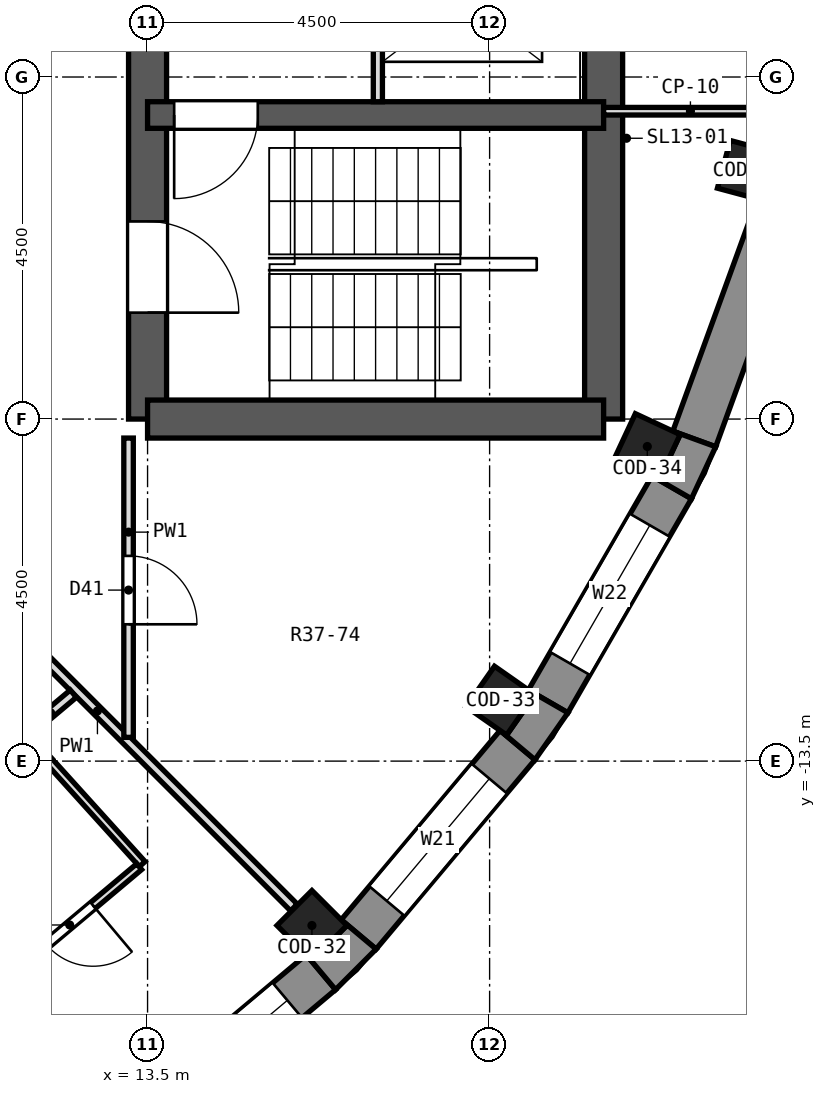
"""IFC4 building model, lengths in metres.
Left out: names, types, materials, properties, quantities, classifications, styles, units other than length and angle.
Written with IfcOpenShell. Run it as: python <this file> out.ifc"""

import sys

from ifc_helpers import new_model, si_unit, direction, frame, frame_2d, origin, origin_2d, place, context, subcontext, project, spatial, polyline, rectangle, outline, extrude, element, fill, save


model = new_model("IFC4")
c1 = context("Model", 3, precision=1e-05, world=origin(), true_north=direction((0.0, 1.0)))
c2 = subcontext(c1, "Body", "Model", "MODEL_VIEW")
j1 = project(units=[si_unit("LENGTHUNIT", "METRE"), si_unit("PLANEANGLEUNIT", "RADIAN")], contexts=[c1])
p1 = place(None, origin())
s1 = spatial("IfcSite", under=j1, at=p1, CompositionType="ELEMENT")
p2 = place(p1, origin())
s2 = spatial("IfcBuilding", under=s1, at=p2, CompositionType="ELEMENT")
p3 = place(p2, frame((0.0, 0.0, 269.3)))
s3 = spatial("IfcBuildingStorey", under=s2, at=p3, CompositionType="ELEMENT", Elevation=269.3)
for number, where, z_axis, x_axis in (
    (1, (15.662, -15.662, 0.0), (0.0, 0.0, 1.0), (0.707, -0.707, 0.0)),
    (2, (18.144, -12.705, 0.0), (0.0, 0.0, 1.0), (0.819, -0.574, 0.0)),
    (3, (20.075, -9.361, 0.0), (0.0, 0.0, 1.0), (0.906, -0.423, 0.0)),
    (4, (21.395, -5.733, 0.0), (0.0, 0.0, 1.0), (0.966, -0.259, 0.0)),
):
    element("IfcColumn", number, at=place(p3, frame(where, z_axis=z_axis, x_axis=x_axis)), inside=s3, PredefinedType="COLUMN", context=c2, shape_type="SweptSolid", body=[
        extrude(rectangle(XDim=0.65, YDim=0.65, at=origin_2d()), origin(), (0.0, 0.0, 1.0), 3.3),
    ])
p4 = place(p3, frame((13.5, -9.0, 0.0), z_axis=(0.0, 0.0, 1.0), x_axis=(0.0, 1.0, 0.0)))
e5 = element("IfcWall", 5, at=p4, inside=s3, PredefinedType="SHEAR", context=c2, shape_type="SweptSolid", body=[
    extrude(rectangle(XDim=18.0, YDim=0.5, at=frame_2d((9.0, 0.0))), origin(), (0.0, 0.0, 1.0), 3.3),
])
p5 = place(p4, frame((15.4, 0.0, 0.0)))
e6 = element("IfcOpeningElement", 6, at=p5, cuts=e5, PredefinedType="OPENING", context=c2, shape_type="SweptSolid", body=[
    extrude(rectangle(XDim=1.2, YDim=2.1, at=frame_2d((0.6, 1.05))), frame((0.0, 0.262, 0.0), z_axis=(0.0, -1.0, 0.0), x_axis=(1.0, 0.0, 0.0)), (0.0, 0.0, 1.0), 0.524),
])
p6 = place(p4, frame((1.4, 0.0, 0.0)))
e7 = element("IfcOpeningElement", 7, at=p6, cuts=e5, PredefinedType="OPENING", context=c2, shape_type="SweptSolid", body=[
    extrude(rectangle(XDim=1.2, YDim=2.1, at=frame_2d((0.6, 1.05))), frame((0.0, 0.262, 0.0), z_axis=(0.0, -1.0, 0.0), x_axis=(1.0, 0.0, 0.0)), (0.0, 0.0, 1.0), 0.524),
])
p7 = place(p4, frame((7.5, 0.0, 0.0)))
e8 = element("IfcOpeningElement", 8, at=p7, cuts=e5, PredefinedType="OPENING", context=c2, shape_type="SweptSolid", body=[
    extrude(rectangle(XDim=3.0, YDim=2.4, at=frame_2d((1.5, 1.2))), frame((0.0, 0.262, 0.0), z_axis=(0.0, -1.0, 0.0), x_axis=(1.0, 0.0, 0.0)), (0.0, 0.0, 1.0), 0.524),
])
p8 = place(p3, frame((19.5, -9.0, 0.0), z_axis=(0.0, 0.0, 1.0), x_axis=(0.0, 1.0, 0.0)))
e9 = element("IfcWall", 9, at=p8, inside=s3, PredefinedType="SHEAR", context=c2, shape_type="SweptSolid", body=[
    extrude(rectangle(XDim=18.0, YDim=0.5, at=frame_2d((9.0, 0.0))), origin(), (0.0, 0.0, 1.0), 3.3),
])
p9 = place(p8, frame((9.45, 0.0, 0.0)))
e10 = element("IfcOpeningElement", 10, at=p9, cuts=e9, PredefinedType="OPENING", context=c2, shape_type="SweptSolid", body=[
    extrude(rectangle(XDim=0.9, YDim=2.1, at=frame_2d((0.45, 1.05))), frame((0.0, 0.262, 0.0), z_axis=(0.0, -1.0, 0.0), x_axis=(1.0, 0.0, 0.0)), (0.0, 0.0, 1.0), 0.524),
])
p10 = place(p8, frame((7.65, 0.0, 0.0)))
e11 = element("IfcOpeningElement", 11, at=p10, cuts=e9, PredefinedType="OPENING", context=c2, shape_type="SweptSolid", body=[
    extrude(rectangle(XDim=0.9, YDim=2.1, at=frame_2d((0.45, 1.05))), frame((0.0, 0.262, 0.0), z_axis=(0.0, -1.0, 0.0), x_axis=(1.0, 0.0, 0.0)), (0.0, 0.0, 1.0), 0.524),
])
p11 = place(p3, frame((13.5, -9.0, 0.0), z_axis=(0.0, 0.0, 1.0), x_axis=(1.0, 0.0, 0.0)))
e12 = element("IfcWall", 12, at=p11, inside=s3, PredefinedType="SHEAR", context=c2, shape_type="SweptSolid", body=[
    extrude(rectangle(XDim=6.0, YDim=0.5, at=frame_2d((3.0, 0.0))), origin(), (0.0, 0.0, 1.0), 3.3),
])
p12 = place(p3, frame((13.5, -5.0, 0.0), z_axis=(0.0, 0.0, 1.0), x_axis=(1.0, 0.0, 0.0)))
e13 = element("IfcWall", 13, at=p12, inside=s3, PredefinedType="SHEAR", context=c2, shape_type="SweptSolid", body=[
    extrude(rectangle(XDim=6.0, YDim=0.35, at=frame_2d((3.0, 0.0))), origin(), (0.0, 0.0, 1.0), 3.3),
])
p13 = place(p12, frame((0.35, 0.0, 0.0)))
e14 = element("IfcOpeningElement", 14, at=p13, cuts=e13, PredefinedType="OPENING", context=c2, shape_type="SweptSolid", body=[
    extrude(rectangle(XDim=1.1, YDim=2.1, at=frame_2d((0.55, 1.05))), frame((0.0, 0.187, 0.0), z_axis=(0.0, -1.0, 0.0), x_axis=(1.0, 0.0, 0.0)), (0.0, 0.0, 1.0), 0.374),
])
p14 = place(p3, frame((13.29, -18.367, 0.0), z_axis=(0.0, 0.0, 1.0), x_axis=(0.766056773982, 0.64277291405, 0.0)))
e15 = element("IfcWall", 15, at=p14, inside=s3, PredefinedType="SOLIDWALL", context=c2, shape_type="SweptSolid", body=[
    extrude(rectangle(XDim=3.252, YDim=0.6, at=frame_2d((1.626, 0.0))), origin(), (0.0, 0.0, 1.0), 2.9),
])
p15 = place(p14, frame((0.576, 0.0, 0.9)))
e16 = element("IfcOpeningElement", 16, at=p15, cuts=e15, PredefinedType="OPENING", context=c2, shape_type="SweptSolid", body=[
    extrude(rectangle(XDim=2.1, YDim=1.8, at=frame_2d((1.05, 0.9))), frame((0.0, 0.312, 0.0), z_axis=(0.0, -1.0, 0.0), x_axis=(1.0, 0.0, 0.0)), (0.0, 0.0, 1.0), 0.624),
])
p16 = place(p3, frame((16.277, -15.781, 0.0), z_axis=(0.0, 0.0, 1.0), x_axis=(0.64277291405, 0.766056773982, 0.0)))
e17 = element("IfcWall", 17, at=p16, inside=s3, PredefinedType="SOLIDWALL", context=c2, shape_type="SweptSolid", body=[
    extrude(rectangle(XDim=3.252, YDim=0.6, at=frame_2d((1.626, 0.0))), origin(), (0.0, 0.0, 1.0), 2.9),
])
p17 = place(p16, frame((0.576, 0.0, 0.9)))
e18 = element("IfcOpeningElement", 18, at=p17, cuts=e17, PredefinedType="OPENING", context=c2, shape_type="SweptSolid", body=[
    extrude(rectangle(XDim=2.1, YDim=1.8, at=frame_2d((1.05, 0.9))), frame((0.0, 0.312, 0.0), z_axis=(0.0, -1.0, 0.0), x_axis=(1.0, 0.0, 0.0)), (0.0, 0.0, 1.0), 0.624),
])
p18 = place(p3, frame((18.77, -12.714, 0.0), z_axis=(0.0, 0.0, 1.0), x_axis=(0.500014901547, 0.866016800201, 0.0)))
e19 = element("IfcWall", 19, at=p18, inside=s3, PredefinedType="SOLIDWALL", context=c2, shape_type="SweptSolid", body=[
    extrude(rectangle(XDim=3.252, YDim=0.6, at=frame_2d((1.626, 0.0))), origin(), (0.0, 0.0, 1.0), 2.9),
])
p19 = place(p18, frame((0.576, 0.0, 0.9)))
e20 = element("IfcOpeningElement", 20, at=p19, cuts=e19, PredefinedType="OPENING", context=c2, shape_type="SweptSolid", body=[
    extrude(rectangle(XDim=2.1, YDim=1.8, at=frame_2d((1.05, 0.9))), frame((0.0, 0.312, 0.0), z_axis=(0.0, -1.0, 0.0), x_axis=(1.0, 0.0, 0.0)), (0.0, 0.0, 1.0), 0.624),
])
p20 = place(p3, frame((20.693, -9.262, 0.0), z_axis=(0.0, 0.0, 1.0), x_axis=(0.342056509473, 0.939679383794, 0.0)))
e21 = element("IfcWall", 21, at=p20, inside=s3, PredefinedType="SOLIDWALL", context=c2, shape_type="SweptSolid", body=[
    extrude(rectangle(XDim=3.252, YDim=0.6, at=frame_2d((1.626, 0.0))), origin(), (0.0, 0.0, 1.0), 2.9),
])
p21 = place(p3, origin())
e22 = element("IfcWall", 22, at=p21, inside=s3, PredefinedType="SOLIDWALL", context=c2, shape_type="SweptSolid", body=[
    extrude(outline(polyline([(16.507, -15.973), (16.047, -15.588), (16.122, -15.662), (15.662, -16.122), (15.588, -16.047), (15.973, -16.507), (16.507, -15.973)])), origin(), (0.0, 0.0, 1.0), 2.9),
])
p22 = place(p3, origin())
e23 = element("IfcWall", 23, at=p22, inside=s3, PredefinedType="SOLIDWALL", context=c2, shape_type="SweptSolid", body=[
    extrude(outline(polyline([(19.03, -12.864), (18.51, -12.564), (18.597, -12.625), (18.224, -13.157), (18.137, -13.097), (18.597, -13.482), (19.03, -12.864)])), origin(), (0.0, 0.0, 1.0), 2.9),
])
p23 = place(p3, origin())
e24 = element("IfcWall", 24, at=p23, inside=s3, PredefinedType="SOLIDWALL", context=c2, shape_type="SweptSolid", body=[
    extrude(outline(polyline([(20.656, -10.048), (20.975, -9.364), (20.411, -9.159), (20.507, -9.204), (20.232, -9.793), (20.136, -9.748), (20.656, -10.048)])), origin(), (0.0, 0.0, 1.0), 2.9),
])
p24 = place(p3, frame((11.887, -13.148, 0.0), z_axis=(0.0, 0.0, 1.0), x_axis=(0.67055763685, -0.741857436211, 0.0)))
e25 = element("IfcWall", 25, at=p24, inside=s3, PredefinedType="PARTITIONING", context=c2, shape_type="SweptSolid", body=[
    extrude(rectangle(XDim=2.301, YDim=0.1, at=frame_2d((1.15, 0.0))), origin(), (0.0, 0.0, 1.0), 2.9),
])
p25 = place(p3, frame((10.256, -10.256, 0.0), z_axis=(0.0, 0.0, 1.0), x_axis=(0.707106781187, -0.707106781187, 0.0)))
e26 = element("IfcWall", 26, at=p25, inside=s3, PredefinedType="PARTITIONING", context=c2, shape_type="SweptSolid", body=[
    extrude(rectangle(XDim=7.311, YDim=0.125, at=frame_2d((3.655, 0.0))), origin(), (0.0, 0.0, 1.0), 2.9),
])
p26 = place(p25, frame((1.188, 0.0, 0.0)))
e27 = element("IfcOpeningElement", 27, at=p26, cuts=e26, PredefinedType="OPENING", context=c2, shape_type="SweptSolid", body=[
    extrude(rectangle(XDim=0.9, YDim=2.1, at=frame_2d((0.45, 1.05))), frame((0.0, 0.074, 0.0), z_axis=(0.0, -1.0, 0.0), x_axis=(1.0, 0.0, 0.0)), (0.0, 0.0, 1.0), 0.149),
])
p27 = place(p3, frame((11.561, -16.424, 0.0), z_axis=(0.0, 0.0, 1.0), x_axis=(0.765894211942, 0.642966605753, 0.0)))
e28 = element("IfcWall", 28, at=p27, inside=s3, PredefinedType="PARTITIONING", context=c2, shape_type="SweptSolid", body=[
    extrude(rectangle(XDim=2.387, YDim=0.1, at=frame_2d((1.194, 0.0))), origin(), (0.0, 0.0, 1.0), 2.9),
])
p28 = place(p27, frame((0.794, 0.0, 0.0)))
e29 = element("IfcOpeningElement", 29, at=p28, cuts=e28, PredefinedType="OPENING", context=c2, shape_type="SweptSolid", body=[
    extrude(rectangle(XDim=0.8, YDim=2.1, at=frame_2d((0.4, 1.05))), frame((0.0, 0.062, 0.0), z_axis=(0.0, -1.0, 0.0), x_axis=(1.0, 0.0, 0.0)), (0.0, 0.0, 1.0), 0.124),
])
p29 = place(p3, frame((11.926, -13.115, 0.0), z_axis=(0.0, 0.0, 1.0), x_axis=(0.765365590348, 0.643595768407, 0.0)))
e30 = element("IfcWall", 30, at=p29, inside=s3, PredefinedType="PARTITIONING", context=c2, shape_type="SweptSolid", body=[
    extrude(rectangle(XDim=0.78, YDim=0.125, at=frame_2d((0.39, 0.0))), origin(), (0.0, 0.0, 1.0), 2.9),
])
p30 = place(p3, frame((13.25, -13.188, 0.0), z_axis=(0.0, 0.0, 1.0), x_axis=(0.0, 1.0, 0.0)))
e31 = element("IfcWall", 31, at=p30, inside=s3, PredefinedType="PARTITIONING", context=c2, shape_type="SweptSolid", body=[
    extrude(rectangle(XDim=3.938, YDim=0.125, at=frame_2d((1.969, 0.0))), origin(), (0.0, 0.0, 1.0), 2.9),
])
p31 = place(p30, frame((1.488, 0.0, 0.0)))
e32 = element("IfcOpeningElement", 32, at=p31, cuts=e31, PredefinedType="OPENING", context=c2, shape_type="SweptSolid", body=[
    extrude(rectangle(XDim=0.9, YDim=2.1, at=frame_2d((0.45, 1.05))), frame((0.0, 0.074, 0.0), z_axis=(0.0, -1.0, 0.0), x_axis=(1.0, 0.0, 0.0)), (0.0, 0.0, 1.0), 0.149),
])
p32 = place(p3, frame((19.5, -4.95, 0.0), z_axis=(0.0, 0.0, 1.0), x_axis=(1.0, 0.0, 0.0)))
e33 = element("IfcWall", 33, at=p32, inside=s3, PredefinedType="PARTITIONING", context=c2, shape_type="SweptSolid", body=[
    extrude(rectangle(XDim=2.284, YDim=0.1, at=frame_2d((1.142, 0.0))), origin(), (0.0, 0.0, 1.0), 2.9),
])
p33 = place(p3, frame((16.53, -4.825, 0.0), z_axis=(0.0, 0.0, 1.0), x_axis=(0.0, 1.0, 0.0)))
e34 = element("IfcWall", 34, at=p33, inside=s3, PredefinedType="PARTITIONING", context=c2, shape_type="SweptSolid", body=[
    extrude(rectangle(XDim=2.65, YDim=0.12, at=frame_2d((1.325, 0.0))), origin(), (0.0, 0.0, 1.0), 2.9),
])
p34 = place(p33, frame((0.775, 0.0, 0.0)))
e35 = element("IfcOpeningElement", 35, at=p34, cuts=e34, PredefinedType="OPENING", context=c2, shape_type="SweptSolid", body=[
    extrude(rectangle(XDim=1.1, YDim=2.1, at=frame_2d((0.55, 1.05))), frame((0.0, 0.072, 0.0), z_axis=(0.0, -1.0, 0.0), x_axis=(1.0, 0.0, 0.0)), (0.0, 0.0, 1.0), 0.144),
])
p35 = place(p15, origin())
e36 = element("IfcWindow", 36, at=p35, inside=s3, PartitioningType="SINGLE_PANEL", PredefinedType="WINDOW", context=c2, shape_type="SweptSolid", body=[
    extrude(rectangle(XDim=2.1, YDim=1.8, at=frame_2d((1.05, 0.9))), frame((0.0, 0.18, 0.0), z_axis=(0.0, -1.0, 0.0), x_axis=(1.0, 0.0, 0.0)), (0.0, 0.0, 1.0), 0.06),
])
fill(e16, e36)
p36 = place(p17, origin())
e37 = element("IfcWindow", 37, at=p36, inside=s3, PartitioningType="SINGLE_PANEL", PredefinedType="WINDOW", context=c2, shape_type="SweptSolid", body=[
    extrude(rectangle(XDim=2.1, YDim=1.8, at=frame_2d((1.05, 0.9))), frame((0.0, 0.18, 0.0), z_axis=(0.0, -1.0, 0.0), x_axis=(1.0, 0.0, 0.0)), (0.0, 0.0, 1.0), 0.06),
])
fill(e18, e37)
p37 = place(p19, origin())
e38 = element("IfcWindow", 38, at=p37, inside=s3, PartitioningType="SINGLE_PANEL", PredefinedType="WINDOW", context=c2, shape_type="SweptSolid", body=[
    extrude(rectangle(XDim=2.1, YDim=1.8, at=frame_2d((1.05, 0.9))), frame((0.0, 0.18, 0.0), z_axis=(0.0, -1.0, 0.0), x_axis=(1.0, 0.0, 0.0)), (0.0, 0.0, 1.0), 0.06),
])
fill(e20, e38)
p38 = place(p28, frame((0.8, 0.0, 0.0), z_axis=(0.0, 0.0, 1.0), x_axis=(-1.0, 0.0, 0.0)))
e39 = element("IfcDoor", 39, at=p38, inside=s3, OperationType="SINGLE_SWING_LEFT", PredefinedType="DOOR", context=c2, shape_type="SweptSolid", body=[
    extrude(rectangle(XDim=0.8, YDim=2.1, at=frame_2d((0.4, 1.05))), frame((0.0, 0.025, 0.0), z_axis=(0.0, -1.0, 0.0), x_axis=(1.0, 0.0, 0.0)), (0.0, 0.0, 1.0), 0.05),
])
fill(e29, e39)
p39 = place(p31, frame((0.9, 0.0, 0.0), z_axis=(0.0, 0.0, 1.0), x_axis=(-1.0, 0.0, 0.0)))
e40 = element("IfcDoor", 40, at=p39, inside=s3, OperationType="SINGLE_SWING_RIGHT", PredefinedType="DOOR", context=c2, shape_type="SweptSolid", body=[
    extrude(rectangle(XDim=0.9, YDim=2.1, at=frame_2d((0.45, 1.05))), frame((0.0, 0.025, 0.0), z_axis=(0.0, -1.0, 0.0), x_axis=(1.0, 0.0, 0.0)), (0.0, 0.0, 1.0), 0.05),
])
fill(e32, e40)
p40 = place(p13, frame((1.1, 0.0, 0.0), z_axis=(0.0, 0.0, 1.0), x_axis=(-1.0, 0.0, 0.0)))
e41 = element("IfcDoor", 41, at=p40, inside=s3, OperationType="SINGLE_SWING_RIGHT", PredefinedType="DOOR", context=c2, shape_type="SweptSolid", body=[
    extrude(rectangle(XDim=1.1, YDim=2.1, at=frame_2d((0.55, 1.05))), frame((0.0, 0.025, 0.0), z_axis=(0.0, -1.0, 0.0), x_axis=(1.0, 0.0, 0.0)), (0.0, 0.0, 1.0), 0.05),
])
fill(e14, e41)
p41 = place(p6, frame((1.2, 0.0, 0.0), z_axis=(0.0, 0.0, 1.0), x_axis=(-1.0, 0.0, 0.0)))
e42 = element("IfcDoor", 42, at=p41, inside=s3, OperationType="SINGLE_SWING_RIGHT", PredefinedType="DOOR", context=c2, shape_type="SweptSolid", body=[
    extrude(rectangle(XDim=1.2, YDim=2.1, at=frame_2d((0.6, 1.05))), frame((0.0, 0.025, 0.0), z_axis=(0.0, -1.0, 0.0), x_axis=(1.0, 0.0, 0.0)), (0.0, 0.0, 1.0), 0.05),
])
fill(e7, e42)
save(model, sys.argv[1])
